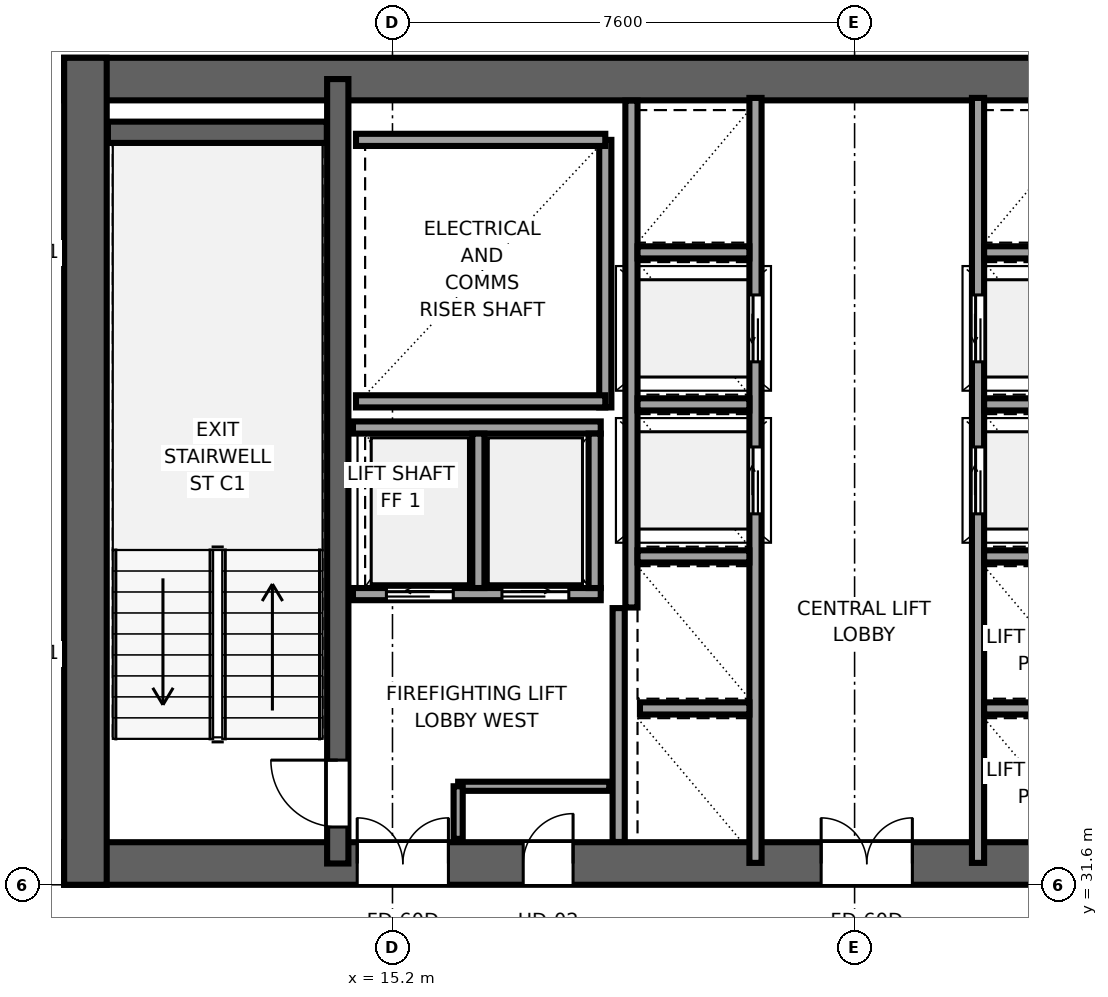
"""IFC4 building model, lengths in metres.
Left out: names, types, materials, properties, quantities, classifications, styles, units other than length and angle.
Written with IfcOpenShell. Run it as: python <this file> out.ifc"""

import sys

from ifc_helpers import new_model, si_unit, direction, frame, frame_2d, origin, place, context, subcontext, project, spatial, rectangle, extrude, source, transform, mapped, element, fill, save


model = new_model("IFC4")
c1 = context("Model", 3, precision=1e-05, world=origin(), true_north=direction((0.0, 1.0)))
c2 = subcontext(c1, "Body", "Model", "MODEL_VIEW")
j1 = project(units=[si_unit("LENGTHUNIT", "METRE"), si_unit("PLANEANGLEUNIT", "RADIAN")], contexts=[c1])
p1 = place(None, origin())
s1 = spatial("IfcSite", under=j1, at=p1, CompositionType="ELEMENT")
p2 = place(p1, origin())
s2 = spatial("IfcBuilding", under=s1, at=p2, CompositionType="ELEMENT")
p3 = place(p2, frame((0.0, 0.0, 198.2)))
s3 = spatial("IfcBuildingStorey", under=s2, at=p3, CompositionType="ELEMENT", Elevation=198.2)
p4 = place(p3, frame((9.8, 31.95, 0.0), z_axis=(0.0, 0.0, 1.0), x_axis=(1.0, 0.0, 0.0)))
e1 = element("IfcWall", 1, at=p4, inside=s3, PredefinedType="SHEAR", context=c2, shape_type="SweptSolid", body=[
    extrude(rectangle(XDim=26.4, YDim=0.7, at=frame_2d((13.2, 0.0))), origin(), (0.0, 0.0, 1.0), 3.55),
])
p5 = place(p4, frame((6.32, 0.0, 0.0), z_axis=(0.0, 0.0, 1.0), x_axis=(-1.0, 0.0, 0.0)))
e2 = element("IfcOpeningElement", 2, at=p5, cuts=e1, PredefinedType="OPENING", context=c2, shape_type="SweptSolid", body=[
    extrude(rectangle(XDim=1.5, YDim=2.04, at=frame_2d((0.75, 1.02))), frame((0.0, 0.36, 0.0), z_axis=(0.0, -1.0, 0.0), x_axis=(1.0, 0.0, 0.0)), (0.0, 0.0, 1.0), 0.72),
])
p6 = place(p4, frame((13.95, 0.0, 0.0), z_axis=(0.0, 0.0, 1.0), x_axis=(-1.0, 0.0, 0.0)))
e3 = element("IfcOpeningElement", 3, at=p6, cuts=e1, PredefinedType="OPENING", context=c2, shape_type="SweptSolid", body=[
    extrude(rectangle(XDim=1.5, YDim=2.04, at=frame_2d((0.75, 1.02))), frame((0.0, 0.36, 0.0), z_axis=(0.0, -1.0, 0.0), x_axis=(1.0, 0.0, 0.0)), (0.0, 0.0, 1.0), 0.72),
])
p7 = place(p4, frame((20.25, 0.0, 0.0), z_axis=(0.0, 0.0, 1.0), x_axis=(-1.0, 0.0, 0.0)))
e4 = element("IfcOpeningElement", 4, at=p7, cuts=e1, PredefinedType="OPENING", context=c2, shape_type="SweptSolid", body=[
    extrude(rectangle(XDim=1.5, YDim=2.04, at=frame_2d((0.75, 1.02))), frame((0.0, 0.36, 0.0), z_axis=(0.0, -1.0, 0.0), x_axis=(1.0, 0.0, 0.0)), (0.0, 0.0, 1.0), 0.72),
])
p8 = place(p4, frame((8.37, 0.0, 0.0), z_axis=(0.0, 0.0, 1.0), x_axis=(-1.0, 0.0, 0.0)))
e5 = element("IfcOpeningElement", 5, at=p8, cuts=e1, PredefinedType="OPENING", context=c2, shape_type="SweptSolid", body=[
    extrude(rectangle(XDim=0.82, YDim=2.01, at=frame_2d((0.41, 1.005))), frame((0.0, 0.36, 0.0), z_axis=(0.0, -1.0, 0.0), x_axis=(1.0, 0.0, 0.0)), (0.0, 0.0, 1.0), 0.72),
])
p9 = place(p3, frame((9.8, 44.85, 0.0), z_axis=(0.0, 0.0, 1.0), x_axis=(1.0, 0.0, 0.0)))
e6 = element("IfcWall", 6, at=p9, inside=s3, PredefinedType="SHEAR", context=c2, shape_type="SweptSolid", body=[
    extrude(rectangle(XDim=26.4, YDim=0.7, at=frame_2d((13.2, 0.0))), origin(), (0.0, 0.0, 1.0), 3.55),
])
p10 = place(p3, frame((10.15, 31.6, 0.0), z_axis=(0.0, 0.0, 1.0), x_axis=(0.0, 1.0, 0.0)))
e7 = element("IfcWall", 7, at=p10, inside=s3, PredefinedType="SHEAR", context=c2, shape_type="SweptSolid", body=[
    extrude(rectangle(XDim=13.6, YDim=0.7, at=frame_2d((6.8, 0.0))), origin(), (0.0, 0.0, 1.0), 3.55),
])
p11 = place(p3, frame((14.3, 31.95, 0.0), z_axis=(0.0, 0.0, 1.0), x_axis=(0.0, 1.0, 0.0)))
e8 = element("IfcWall", 8, at=p11, inside=s3, PredefinedType="SHEAR", context=c2, shape_type="SweptSolid", body=[
    extrude(rectangle(XDim=12.9, YDim=0.35, at=frame_2d((6.45, 0.0))), origin(), (0.0, 0.0, 1.0), 3.55),
])
p12 = place(p11, frame((0.6, 0.0, 0.0)))
e9 = element("IfcOpeningElement", 9, at=p12, cuts=e8, PredefinedType="OPENING", context=c2, shape_type="SweptSolid", body=[
    extrude(rectangle(XDim=1.1, YDim=2.12, at=frame_2d((0.55, 1.06))), frame((0.0, 0.185, 0.0), z_axis=(0.0, -1.0, 0.0), x_axis=(1.0, 0.0, 0.0)), (0.0, 0.0, 1.0), 0.37),
])
p13 = place(p3, frame((10.52, 43.975, 0.0), z_axis=(0.0, 0.0, 1.0), x_axis=(1.0, 0.0, 0.0)))
e10 = element("IfcWall", 10, at=p13, inside=s3, PredefinedType="SHEAR", context=c2, shape_type="SweptSolid", body=[
    extrude(rectangle(XDim=3.6, YDim=0.35, at=frame_2d((1.8, 0.0))), origin(), (0.0, 0.0, 1.0), 3.55),
])
p14 = place(p3, frame((18.7, 39.45, 0.0), z_axis=(0.0, 0.0, 1.0), x_axis=(0.0, 1.0, 0.0)))
e11 = element("IfcWall", 11, at=p14, inside=s3, PredefinedType="SOLIDWALL", context=c2, shape_type="SweptSolid", body=[
    extrude(rectangle(XDim=4.4, YDim=0.2, at=frame_2d((2.2, 0.0))), origin(), (0.0, 0.0, 1.0), 3.37),
])
for number, where, z_axis, x_axis in (
    (12, (14.6, 39.55, 0.0), (0.0, 0.0, 1.0), (1.0, 0.0, 0.0)),
    (13, (14.6, 43.85, 0.0), (0.0, 0.0, 1.0), (1.0, 0.0, 0.0)),
):
    element("IfcWall", number, at=place(p3, frame(where, z_axis=z_axis, x_axis=x_axis)), inside=s3, PredefinedType="SOLIDWALL", context=c2, shape_type="SweptSolid", body=[
        extrude(rectangle(XDim=4.1, YDim=0.2, at=frame_2d((2.05, 0.0))), origin(), (0.0, 0.0, 1.0), 3.37),
    ])
p15 = place(p3, frame((18.92, 32.304, 0.0), z_axis=(0.0, 0.0, 1.0), x_axis=(0.0, 1.0, 0.0)))
e14 = element("IfcWall", 14, at=p15, inside=s3, PredefinedType="SOLIDWALL", context=c2, shape_type="SweptSolid", body=[
    extrude(rectangle(XDim=3.846, YDim=0.2, at=frame_2d((1.923, 0.0))), origin(), (0.0, 0.0, 1.0), 3.37),
])
p16 = place(p3, frame((21.17, 31.96, 0.0), z_axis=(0.0, 0.0, 1.0), x_axis=(0.0, 1.0, 0.0)))
e15 = element("IfcWall", 15, at=p16, inside=s3, PredefinedType="SOLIDWALL", context=c2, shape_type="SweptSolid", body=[
    extrude(rectangle(XDim=12.58, YDim=0.2, at=frame_2d((6.29, 0.0))), origin(), (0.0, 0.0, 1.0), 3.37),
])
p17 = place(p16, frame((5.74, 0.0, 0.0)))
e16 = element("IfcOpeningElement", 16, at=p17, cuts=e15, PredefinedType="OPENING", context=c2, shape_type="SweptSolid", body=[
    extrude(rectangle(XDim=1.1, YDim=2.12, at=frame_2d((0.55, 1.06))), frame((0.0, 0.11, 0.0), z_axis=(0.0, -1.0, 0.0), x_axis=(1.0, 0.0, 0.0)), (0.0, 0.0, 1.0), 0.22),
])
p18 = place(p16, frame((8.24, 0.0, 0.0)))
e17 = element("IfcOpeningElement", 17, at=p18, cuts=e15, PredefinedType="OPENING", context=c2, shape_type="SweptSolid", body=[
    extrude(rectangle(XDim=1.1, YDim=2.12, at=frame_2d((0.55, 1.06))), frame((0.0, 0.11, 0.0), z_axis=(0.0, -1.0, 0.0), x_axis=(1.0, 0.0, 0.0)), (0.0, 0.0, 1.0), 0.22),
])
p19 = place(p3, frame((19.13, 36.16, 0.0), z_axis=(0.0, 0.0, 1.0), x_axis=(0.0, 1.0, 0.0)))
e18 = element("IfcWall", 18, at=p19, inside=s3, PredefinedType="SOLIDWALL", context=c2, shape_type="SweptSolid", body=[
    extrude(rectangle(XDim=8.336, YDim=0.2, at=frame_2d((4.168, 0.0))), origin(), (0.0, 0.0, 1.0), 3.37),
])
p20 = place(p3, frame((19.27, 34.5, 0.0), z_axis=(0.0, 0.0, 1.0), x_axis=(1.0, 0.0, 0.0)))
e19 = element("IfcWall", 19, at=p20, inside=s3, PredefinedType="SOLIDWALL", context=c2, shape_type="SweptSolid", body=[
    extrude(rectangle(XDim=1.8, YDim=0.2, at=frame_2d((0.9, 0.0))), origin(), (0.0, 0.0, 1.0), 3.37),
])
for number, where, z_axis, x_axis in (
    (20, (19.23, 37.0, 0.0), (0.0, 0.0, 1.0), (1.0, 0.0, 0.0)),
    (21, (19.23, 39.5, 0.0), (0.0, 0.0, 1.0), (1.0, 0.0, 0.0)),
    (22, (19.23, 42.0, 0.0), (0.0, 0.0, 1.0), (1.0, 0.0, 0.0)),
):
    element("IfcWall", number, at=place(p3, frame(where, z_axis=z_axis, x_axis=x_axis)), inside=s3, PredefinedType="SOLIDWALL", context=c2, shape_type="SweptSolid", body=[
        extrude(rectangle(XDim=1.84, YDim=0.2, at=frame_2d((0.92, 0.0))), origin(), (0.0, 0.0, 1.0), 3.37),
    ])
p21 = place(p3, frame((14.55, 36.38, 0.0), z_axis=(0.0, 0.0, 1.0), x_axis=(1.0, 0.0, 0.0)))
e23 = element("IfcWall", 23, at=p21, inside=s3, PredefinedType="SOLIDWALL", context=c2, shape_type="SweptSolid", body=[
    extrude(rectangle(XDim=4.075, YDim=0.2, at=frame_2d((2.038, 0.0))), origin(), (0.0, 0.0, 1.0), 3.37),
])
p22 = place(p21, frame((0.55, 0.0, 0.0)))
e24 = element("IfcOpeningElement", 24, at=p22, cuts=e23, PredefinedType="OPENING", context=c2, shape_type="SweptSolid", body=[
    extrude(rectangle(XDim=1.1, YDim=2.12, at=frame_2d((0.55, 1.06))), frame((0.0, 0.11, 0.0), z_axis=(0.0, -1.0, 0.0), x_axis=(1.0, 0.0, 0.0)), (0.0, 0.0, 1.0), 0.22),
])
p23 = place(p21, frame((2.45, 0.0, 0.0)))
e25 = element("IfcOpeningElement", 25, at=p23, cuts=e23, PredefinedType="OPENING", context=c2, shape_type="SweptSolid", body=[
    extrude(rectangle(XDim=1.1, YDim=2.12, at=frame_2d((0.55, 1.06))), frame((0.0, 0.11, 0.0), z_axis=(0.0, -1.0, 0.0), x_axis=(1.0, 0.0, 0.0)), (0.0, 0.0, 1.0), 0.22),
])
p24 = place(p3, frame((14.55, 39.12, 0.0), z_axis=(0.0, 0.0, 1.0), x_axis=(1.0, 0.0, 0.0)))
e26 = element("IfcWall", 26, at=p24, inside=s3, PredefinedType="SOLIDWALL", context=c2, shape_type="SweptSolid", body=[
    extrude(rectangle(XDim=4.075, YDim=0.2, at=frame_2d((2.038, 0.0))), origin(), (0.0, 0.0, 1.0), 3.37),
])
for number, where, z_axis, x_axis in (
    (27, (18.525, 36.48, 0.0), (0.0, 0.0, 1.0), (0.0, 1.0, 0.0)),
    (28, (16.613, 36.48, 0.0), (0.0, 0.0, 1.0), (0.0, 1.0, 0.0)),
):
    element("IfcWall", number, at=place(p3, frame(where, z_axis=z_axis, x_axis=x_axis)), inside=s3, PredefinedType="SOLIDWALL", context=c2, shape_type="SweptSolid", body=[
        extrude(rectangle(XDim=2.54, YDim=0.2, at=frame_2d((1.27, 0.0))), origin(), (0.0, 0.0, 1.0), 3.37),
    ])
p25 = place(p3, frame((24.83, 31.96, 0.0), z_axis=(0.0, 0.0, 1.0), x_axis=(0.0, 1.0, 0.0)))
e29 = element("IfcWall", 29, at=p25, inside=s3, PredefinedType="SOLIDWALL", context=c2, shape_type="SweptSolid", body=[
    extrude(rectangle(XDim=12.58, YDim=0.2, at=frame_2d((6.29, 0.0))), origin(), (0.0, 0.0, 1.0), 3.37),
])
p26 = place(p25, frame((5.74, 0.0, 0.0)))
e30 = element("IfcOpeningElement", 30, at=p26, cuts=e29, PredefinedType="OPENING", context=c2, shape_type="SweptSolid", body=[
    extrude(rectangle(XDim=1.1, YDim=2.12, at=frame_2d((0.55, 1.06))), frame((0.0, 0.11, 0.0), z_axis=(0.0, -1.0, 0.0), x_axis=(1.0, 0.0, 0.0)), (0.0, 0.0, 1.0), 0.22),
])
p27 = place(p25, frame((8.24, 0.0, 0.0)))
e31 = element("IfcOpeningElement", 31, at=p27, cuts=e29, PredefinedType="OPENING", context=c2, shape_type="SweptSolid", body=[
    extrude(rectangle(XDim=1.1, YDim=2.12, at=frame_2d((0.55, 1.06))), frame((0.0, 0.11, 0.0), z_axis=(0.0, -1.0, 0.0), x_axis=(1.0, 0.0, 0.0)), (0.0, 0.0, 1.0), 0.22),
])
p28 = place(p3, frame((24.93, 34.5, 0.0), z_axis=(0.0, 0.0, 1.0), x_axis=(1.0, 0.0, 0.0)))
e32 = element("IfcWall", 32, at=p28, inside=s3, PredefinedType="SOLIDWALL", context=c2, shape_type="SweptSolid", body=[
    extrude(rectangle(XDim=1.8, YDim=0.2, at=frame_2d((0.9, 0.0))), origin(), (0.0, 0.0, 1.0), 3.37),
])
for number, where, z_axis, x_axis in (
    (33, (24.93, 37.0, 0.0), (0.0, 0.0, 1.0), (1.0, 0.0, 0.0)),
    (34, (24.93, 39.5, 0.0), (0.0, 0.0, 1.0), (1.0, 0.0, 0.0)),
    (35, (24.93, 42.0, 0.0), (0.0, 0.0, 1.0), (1.0, 0.0, 0.0)),
):
    element("IfcWall", number, at=place(p3, frame(where, z_axis=z_axis, x_axis=x_axis)), inside=s3, PredefinedType="SOLIDWALL", context=c2, shape_type="SweptSolid", body=[
        extrude(rectangle(XDim=1.84, YDim=0.2, at=frame_2d((0.92, 0.0))), origin(), (0.0, 0.0, 1.0), 3.37),
    ])
p29 = place(p3, frame((16.28, 33.22, 0.0), z_axis=(0.0, 0.0, 1.0), x_axis=(1.0, 0.0, 0.0)))
e36 = element("IfcWall", 36, at=p29, inside=s3, PredefinedType="PARTITIONING", context=c2, shape_type="SweptSolid", body=[
    extrude(rectangle(XDim=2.485, YDim=0.15, at=frame_2d((1.242, 0.0))), origin(), (0.0, 0.0, 1.0), 3.37),
])
p30 = place(p3, frame((16.28, 32.355, 0.0), z_axis=(0.0, 0.0, 1.0), x_axis=(0.0, 1.0, 0.0)))
e37 = element("IfcWall", 37, at=p30, inside=s3, PredefinedType="PARTITIONING", context=c2, shape_type="SweptSolid", body=[
    extrude(rectangle(XDim=0.865, YDim=0.15, at=frame_2d((0.433, 0.0))), origin(), (0.0, 0.0, 1.0), 3.37),
])
m1 = source(origin(), c2, "Body", "SweptSolid", [
    extrude(rectangle(XDim=1.1, YDim=2.12, at=frame_2d((0.55, 1.06))), frame((0.0, 0.025, 0.0), z_axis=(0.0, -1.0, 0.0), x_axis=(1.0, 0.0, 0.0)), (0.0, 0.0, 1.0), 0.05),
])
p31 = place(p12, origin())
e38 = element("IfcDoor", 38, at=p31, inside=s3, OperationType="SINGLE_SWING_RIGHT", PredefinedType="DOOR", context=c2, shape_type="MappedRepresentation", body=[
    mapped(m1, transform((0.0, 0.0, 0.0), x_axis=(1.0, 0.0, 0.0), y_axis=(0.0, 1.0, 0.0), z_axis=(0.0, 0.0, 1.0), scale=1.0)),
])
fill(e9, e38)
m2 = source(origin(), c2, "Body", "SweptSolid", [
    extrude(rectangle(XDim=1.5, YDim=2.04, at=frame_2d((0.75, 1.02))), frame((0.0, 0.025, 0.0), z_axis=(0.0, -1.0, 0.0), x_axis=(1.0, 0.0, 0.0)), (0.0, 0.0, 1.0), 0.05),
])
p32 = place(p5, origin())
e39 = element("IfcDoor", 39, at=p32, inside=s3, OperationType="DOUBLE_DOOR_SINGLE_SWING", PredefinedType="DOOR", context=c2, shape_type="MappedRepresentation", body=[
    mapped(m2, transform((0.0, 0.0, 0.0), x_axis=(1.0, 0.0, 0.0), y_axis=(0.0, 1.0, 0.0), z_axis=(0.0, 0.0, 1.0), scale=1.0)),
])
fill(e2, e39)
p33 = place(p6, origin())
e40 = element("IfcDoor", 40, at=p33, inside=s3, OperationType="DOUBLE_DOOR_SINGLE_SWING", PredefinedType="DOOR", context=c2, shape_type="MappedRepresentation", body=[
    mapped(m2, transform((0.0, 0.0, 0.0), x_axis=(1.0, 0.0, 0.0), y_axis=(0.0, 1.0, 0.0), z_axis=(0.0, 0.0, 1.0), scale=1.0)),
])
fill(e3, e40)
m3 = source(origin(), c2, "Body", "SweptSolid", [
    extrude(rectangle(XDim=0.82, YDim=2.01, at=frame_2d((0.41, 1.005))), frame((0.0, 0.025, 0.0), z_axis=(0.0, -1.0, 0.0), x_axis=(1.0, 0.0, 0.0)), (0.0, 0.0, 1.0), 0.05),
])
p34 = place(p8, origin())
e41 = element("IfcDoor", 41, at=p34, inside=s3, OperationType="SINGLE_SWING_RIGHT", PredefinedType="DOOR", context=c2, shape_type="MappedRepresentation", body=[
    mapped(m3, transform((0.0, 0.0, 0.0), x_axis=(1.0, 0.0, 0.0), y_axis=(0.0, 1.0, 0.0), z_axis=(0.0, 0.0, 1.0), scale=1.0)),
])
fill(e5, e41)
m4 = source(origin(), c2, "Body", "SweptSolid", [
    extrude(rectangle(XDim=1.1, YDim=2.12, at=frame_2d((0.55, 1.06))), frame((0.0, 0.025, 0.0), z_axis=(0.0, -1.0, 0.0), x_axis=(1.0, 0.0, 0.0)), (0.0, 0.0, 1.0), 0.05),
])
p35 = place(p17, origin())
e42 = element("IfcDoor", 42, at=p35, inside=s3, OperationType="SLIDING_TO_RIGHT", PredefinedType="DOOR", context=c2, shape_type="MappedRepresentation", body=[
    mapped(m4, transform((0.0, 0.0, 0.0), x_axis=(1.0, 0.0, 0.0), y_axis=(0.0, 1.0, 0.0), z_axis=(0.0, 0.0, 1.0), scale=1.0)),
])
fill(e16, e42)
p36 = place(p18, origin())
e43 = element("IfcDoor", 43, at=p36, inside=s3, OperationType="SLIDING_TO_LEFT", PredefinedType="DOOR", context=c2, shape_type="MappedRepresentation", body=[
    mapped(m4, transform((0.0, 0.0, 0.0), x_axis=(1.0, 0.0, 0.0), y_axis=(0.0, 1.0, 0.0), z_axis=(0.0, 0.0, 1.0), scale=1.0)),
])
fill(e17, e43)
p37 = place(p22, origin())
e44 = element("IfcDoor", 44, at=p37, inside=s3, OperationType="SLIDING_TO_LEFT", PredefinedType="DOOR", context=c2, shape_type="MappedRepresentation", body=[
    mapped(m4, transform((0.0, 0.0, 0.0), x_axis=(1.0, 0.0, 0.0), y_axis=(0.0, 1.0, 0.0), z_axis=(0.0, 0.0, 1.0), scale=1.0)),
])
fill(e24, e44)
p38 = place(p23, origin())
e45 = element("IfcDoor", 45, at=p38, inside=s3, OperationType="SLIDING_TO_RIGHT", PredefinedType="DOOR", context=c2, shape_type="MappedRepresentation", body=[
    mapped(m4, transform((0.0, 0.0, 0.0), x_axis=(1.0, 0.0, 0.0), y_axis=(0.0, 1.0, 0.0), z_axis=(0.0, 0.0, 1.0), scale=1.0)),
])
fill(e25, e45)
p39 = place(p26, origin())
e46 = element("IfcDoor", 46, at=p39, inside=s3, OperationType="SLIDING_TO_RIGHT", PredefinedType="DOOR", context=c2, shape_type="MappedRepresentation", body=[
    mapped(m4, transform((0.0, 0.0, 0.0), x_axis=(1.0, 0.0, 0.0), y_axis=(0.0, 1.0, 0.0), z_axis=(0.0, 0.0, 1.0), scale=1.0)),
])
fill(e30, e46)
p40 = place(p27, origin())
e47 = element("IfcDoor", 47, at=p40, inside=s3, OperationType="SLIDING_TO_LEFT", PredefinedType="DOOR", context=c2, shape_type="MappedRepresentation", body=[
    mapped(m4, transform((0.0, 0.0, 0.0), x_axis=(1.0, 0.0, 0.0), y_axis=(0.0, 1.0, 0.0), z_axis=(0.0, 0.0, 1.0), scale=1.0)),
])
fill(e31, e47)
save(model, sys.argv[1])
